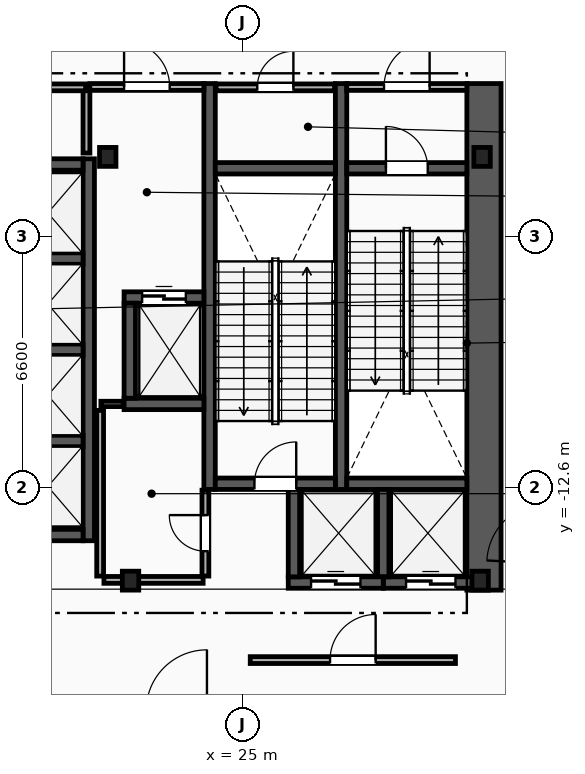
"""IFC4 building model, lengths in metres.
Left out: names, types, materials, properties, quantities, classifications, styles, units other than length and angle.
Written with IfcOpenShell. Run it as: python <this file> out.ifc"""

import sys

from ifc_helpers import new_model, si_unit, direction, frame, frame_2d, origin, origin_2d, place, context, subcontext, project, spatial, rectangle, i_section, extrude, element, fill, save


model = new_model("IFC4")
c1 = context("Model", 3, precision=1e-05, world=origin(), true_north=direction((0.0, 1.0)))
c2 = subcontext(c1, "Body", "Model", "MODEL_VIEW")
j1 = project(units=[si_unit("LENGTHUNIT", "METRE"), si_unit("PLANEANGLEUNIT", "RADIAN")], contexts=[c1])
p1 = place(None, origin())
s1 = spatial("IfcSite", under=j1, at=p1, CompositionType="ELEMENT")
p2 = place(p1, origin())
s2 = spatial("IfcBuilding", under=s1, at=p2, CompositionType="ELEMENT")
p3 = place(p2, origin())
s3 = spatial("IfcBuildingStorey", under=s2, at=p3, CompositionType="ELEMENT", Elevation=0.0)
for number, where, z_axis, x_axis in (
    (1, (31.3, -3.9, 0.0), (0.0, 0.0, 1.0), (1.0, 0.0, 0.0)),
    (2, (21.45, -3.9, 0.0), (0.0, 0.0, 1.0), (1.0, 0.0, 0.0)),
    (3, (22.05, -15.05, 0.0), (0.0, 0.0, 1.0), (1.0, 0.0, 0.0)),
    (4, (31.25, -15.05, 0.0), (0.0, 0.0, 1.0), (1.0, 0.0, 0.0)),
):
    element("IfcColumn", number, at=place(p3, frame(where, z_axis=z_axis, x_axis=x_axis)), inside=s3, PredefinedType="COLUMN", context=c2, shape_type="SweptSolid", body=[
        extrude(i_section(OverallWidth=0.432, OverallDepth=0.498, WebThickness=0.056, FlangeThickness=0.089, FilletRadius=0.018, at=origin_2d()), origin(), (0.0, 0.0, 1.0), 6.0),
    ])
p4 = place(p3, frame((31.35, -15.3, 0.0), z_axis=(0.0, 0.0, 1.0), x_axis=(0.0, 1.0, 0.0)))
e5 = element("IfcWall", 5, at=p4, inside=s3, PredefinedType="SHEAR", context=c2, shape_type="SweptSolid", body=[
    extrude(rectangle(XDim=13.33, YDim=0.9, at=frame_2d((6.665, 0.0))), origin(), (0.0, 0.0, 1.0), 5.65),
])
for number, where, z_axis, x_axis in (
    (6, (27.59, -12.65, 0.0), (0.0, 0.0, 1.0), (0.0, 1.0, 0.0)),
    (7, (24.13, -12.65, 0.0), (0.0, 0.0, 1.0), (0.0, 1.0, 0.0)),
):
    element("IfcWall", number, at=place(p3, frame(where, z_axis=z_axis, x_axis=x_axis)), inside=s3, PredefinedType="SHEAR", context=c2, shape_type="SweptSolid", body=[
        extrude(rectangle(XDim=10.68, YDim=0.3, at=frame_2d((5.34, 0.0))), origin(), (0.0, 0.0, 1.0), 5.65),
    ])
p5 = place(p3, frame((27.74, -4.2, 0.0), z_axis=(0.0, 0.0, 1.0), x_axis=(1.0, 0.0, 0.0)))
e8 = element("IfcWall", 8, at=p5, inside=s3, PredefinedType="SHEAR", context=c2, shape_type="SweptSolid", body=[
    extrude(rectangle(XDim=3.16, YDim=0.3, at=frame_2d((1.58, 0.0))), origin(), (0.0, 0.0, 1.0), 5.65),
])
p6 = place(p5, frame((1.03, 0.0, 0.0)))
e9 = element("IfcOpeningElement", 9, at=p6, cuts=e8, PredefinedType="OPENING", context=c2, shape_type="SweptSolid", body=[
    extrude(rectangle(XDim=1.1, YDim=2.15, at=frame_2d((0.55, 1.075))), frame((0.0, 0.16, 0.0), z_axis=(0.0, -1.0, 0.0), x_axis=(1.0, 0.0, 0.0)), (0.0, 0.0, 1.0), 0.32),
])
p7 = place(p3, frame((27.74, -12.5, 0.0), z_axis=(0.0, 0.0, 1.0), x_axis=(1.0, 0.0, 0.0)))
e10 = element("IfcWall", 10, at=p7, inside=s3, PredefinedType="SHEAR", context=c2, shape_type="SweptSolid", body=[
    extrude(rectangle(XDim=3.16, YDim=0.3, at=frame_2d((1.58, 0.0))), origin(), (0.0, 0.0, 1.0), 5.65),
])
p8 = place(p3, frame((24.28, -12.5, 0.0), z_axis=(0.0, 0.0, 1.0), x_axis=(1.0, 0.0, 0.0)))
e11 = element("IfcWall", 11, at=p8, inside=s3, PredefinedType="SHEAR", context=c2, shape_type="SweptSolid", body=[
    extrude(rectangle(XDim=3.16, YDim=0.3, at=frame_2d((1.58, 0.0))), origin(), (0.0, 0.0, 1.0), 5.65),
])
p9 = place(p8, frame((1.03, 0.0, 0.0)))
e12 = element("IfcOpeningElement", 12, at=p9, cuts=e11, PredefinedType="OPENING", context=c2, shape_type="SweptSolid", body=[
    extrude(rectangle(XDim=1.1, YDim=2.15, at=frame_2d((0.55, 1.075))), frame((0.0, 0.16, 0.0), z_axis=(0.0, -1.0, 0.0), x_axis=(1.0, 0.0, 0.0)), (0.0, 0.0, 1.0), 0.32),
])
p10 = place(p3, frame((24.28, -4.2, 0.0), z_axis=(0.0, 0.0, 1.0), x_axis=(1.0, 0.0, 0.0)))
e13 = element("IfcWall", 13, at=p10, inside=s3, PredefinedType="SHEAR", context=c2, shape_type="SweptSolid", body=[
    extrude(rectangle(XDim=3.16, YDim=0.3, at=frame_2d((1.58, 0.0))), origin(), (0.0, 0.0, 1.0), 5.65),
])
p11 = place(p3, frame((20.89, -3.8, 0.0), z_axis=(0.0, 0.0, 1.0), x_axis=(0.0, 1.0, 0.0)))
e14 = element("IfcWall", 14, at=p11, inside=s3, PredefinedType="PARTITIONING", context=c2, shape_type="SweptSolid", body=[
    extrude(rectangle(XDim=1.65, YDim=0.18, at=frame_2d((0.825, 0.0))), origin(), (0.0, 0.0, 1.0), 5.65),
])
p12 = place(p3, frame((20.98, -2.06, 0.0), z_axis=(0.0, 0.0, 1.0), x_axis=(1.0, 0.0, 0.0)))
e15 = element("IfcWall", 15, at=p12, inside=s3, PredefinedType="PARTITIONING", context=c2, shape_type="SweptSolid", body=[
    extrude(rectangle(XDim=3.0, YDim=0.18, at=frame_2d((1.5, 0.0))), origin(), (0.0, 0.0, 1.0), 5.65),
])
p13 = place(p12, frame((0.9, 0.0, 0.0)))
e16 = element("IfcOpeningElement", 16, at=p13, cuts=e15, PredefinedType="OPENING", context=c2, shape_type="SweptSolid", body=[
    extrude(rectangle(XDim=1.2, YDim=2.15, at=frame_2d((0.6, 1.075))), frame((0.0, 0.1, 0.0), z_axis=(0.0, -1.0, 0.0), x_axis=(1.0, 0.0, 0.0)), (0.0, 0.0, 1.0), 0.2),
])
p14 = place(p3, frame((27.74, -2.06, 0.0), z_axis=(0.0, 0.0, 1.0), x_axis=(1.0, 0.0, 0.0)))
e17 = element("IfcWall", 17, at=p14, inside=s3, PredefinedType="PARTITIONING", context=c2, shape_type="SweptSolid", body=[
    extrude(rectangle(XDim=3.16, YDim=0.18, at=frame_2d((1.58, 0.0))), origin(), (0.0, 0.0, 1.0), 5.65),
])
p15 = place(p14, frame((0.98, 0.0, 0.0)))
e18 = element("IfcOpeningElement", 18, at=p15, cuts=e17, PredefinedType="OPENING", context=c2, shape_type="SweptSolid", body=[
    extrude(rectangle(XDim=1.2, YDim=2.15, at=frame_2d((0.6, 1.075))), frame((0.0, 0.1, 0.0), z_axis=(0.0, -1.0, 0.0), x_axis=(1.0, 0.0, 0.0)), (0.0, 0.0, 1.0), 0.2),
])
p16 = place(p3, frame((25.2, -17.14, 0.0), z_axis=(0.0, 0.0, 1.0), x_axis=(1.0, 0.0, 0.0)))
e19 = element("IfcWall", 19, at=p16, inside=s3, PredefinedType="PARTITIONING", context=c2, shape_type="SweptSolid", body=[
    extrude(rectangle(XDim=5.4, YDim=0.18, at=frame_2d((2.7, 0.0))), origin(), (0.0, 0.0, 1.0), 5.65),
])
p17 = place(p16, frame((2.1, 0.0, 0.0)))
e20 = element("IfcOpeningElement", 20, at=p17, cuts=e19, PredefinedType="OPENING", context=c2, shape_type="SweptSolid", body=[
    extrude(rectangle(XDim=1.2, YDim=2.15, at=frame_2d((0.6, 1.075))), frame((0.0, 0.1, 0.0), z_axis=(0.0, -1.0, 0.0), x_axis=(1.0, 0.0, 0.0)), (0.0, 0.0, 1.0), 0.2),
])
p18 = place(p3, frame((21.88, -7.6, 0.0), z_axis=(0.0, 0.0, 1.0), x_axis=(1.0, 0.0, 0.0)))
e21 = element("IfcWall", 21, at=p18, inside=s3, PredefinedType="SHEAR", context=c2, shape_type="SweptSolid", body=[
    extrude(rectangle(XDim=2.1, YDim=0.3, at=frame_2d((1.05, 0.0))), origin(), (0.0, 0.0, 1.0), 5.65),
])
p19 = place(p18, frame((0.475, 0.0, 0.0)))
e22 = element("IfcOpeningElement", 22, at=p19, cuts=e21, PredefinedType="OPENING", context=c2, shape_type="SweptSolid", body=[
    extrude(rectangle(XDim=1.15, YDim=2.2, at=frame_2d((0.575, 1.1))), frame((0.0, 0.16, 0.0), z_axis=(0.0, -1.0, 0.0), x_axis=(1.0, 0.0, 0.0)), (0.0, 0.0, 1.0), 0.32),
])
p20 = place(p3, frame((21.88, -10.4, 0.0), z_axis=(0.0, 0.0, 1.0), x_axis=(1.0, 0.0, 0.0)))
e23 = element("IfcWall", 23, at=p20, inside=s3, PredefinedType="SHEAR", context=c2, shape_type="SweptSolid", body=[
    extrude(rectangle(XDim=2.1, YDim=0.3, at=frame_2d((1.05, 0.0))), origin(), (0.0, 0.0, 1.0), 5.65),
])
p21 = place(p3, frame((22.03, -10.25, 0.0), z_axis=(0.0, 0.0, 1.0), x_axis=(0.0, 1.0, 0.0)))
e24 = element("IfcWall", 24, at=p21, inside=s3, PredefinedType="SHEAR", context=c2, shape_type="SweptSolid", body=[
    extrude(rectangle(XDim=2.5, YDim=0.3, at=frame_2d((1.25, 0.0))), origin(), (0.0, 0.0, 1.0), 5.65),
])
p22 = place(p3, frame((28.7, -15.1, 0.0), z_axis=(0.0, 0.0, 1.0), x_axis=(1.0, 0.0, 0.0)))
e25 = element("IfcWall", 25, at=p22, inside=s3, PredefinedType="SHEAR", context=c2, shape_type="SweptSolid", body=[
    extrude(rectangle(XDim=2.5, YDim=0.3, at=frame_2d((1.25, 0.0))), origin(), (0.0, 0.0, 1.0), 5.65),
])
p23 = place(p22, frame((0.6, 0.0, 0.0)))
e26 = element("IfcOpeningElement", 26, at=p23, cuts=e25, PredefinedType="OPENING", context=c2, shape_type="SweptSolid", body=[
    extrude(rectangle(XDim=1.3, YDim=2.2, at=frame_2d((0.65, 1.1))), frame((0.0, 0.16, 0.0), z_axis=(0.0, -1.0, 0.0), x_axis=(1.0, 0.0, 0.0)), (0.0, 0.0, 1.0), 0.32),
])
p24 = place(p3, frame((28.7, -14.95, 0.0), z_axis=(0.0, 0.0, 1.0), x_axis=(0.0, 1.0, 0.0)))
e27 = element("IfcWall", 27, at=p24, inside=s3, PredefinedType="SHEAR", context=c2, shape_type="SweptSolid", body=[
    extrude(rectangle(XDim=2.3, YDim=0.3, at=frame_2d((1.15, 0.0))), origin(), (0.0, 0.0, 1.0), 5.65),
])
p25 = place(p3, frame((26.2, -15.1, 0.0), z_axis=(0.0, 0.0, 1.0), x_axis=(1.0, 0.0, 0.0)))
e28 = element("IfcWall", 28, at=p25, inside=s3, PredefinedType="SHEAR", context=c2, shape_type="SweptSolid", body=[
    extrude(rectangle(XDim=2.5, YDim=0.3, at=frame_2d((1.25, 0.0))), origin(), (0.0, 0.0, 1.0), 5.65),
])
p26 = place(p25, frame((0.6, 0.0, 0.0)))
e29 = element("IfcOpeningElement", 29, at=p26, cuts=e28, PredefinedType="OPENING", context=c2, shape_type="SweptSolid", body=[
    extrude(rectangle(XDim=1.3, YDim=2.2, at=frame_2d((0.65, 1.1))), frame((0.0, 0.16, 0.0), z_axis=(0.0, -1.0, 0.0), x_axis=(1.0, 0.0, 0.0)), (0.0, 0.0, 1.0), 0.32),
])
p27 = place(p3, frame((26.35, -14.95, 0.0), z_axis=(0.0, 0.0, 1.0), x_axis=(0.0, 1.0, 0.0)))
e30 = element("IfcWall", 30, at=p27, inside=s3, PredefinedType="SHEAR", context=c2, shape_type="SweptSolid", body=[
    extrude(rectangle(XDim=2.3, YDim=0.3, at=frame_2d((1.15, 0.0))), origin(), (0.0, 0.0, 1.0), 5.65),
])
p28 = place(p3, frame((20.95, -14.0, 0.0), z_axis=(0.0, 0.0, 1.0), x_axis=(0.0, 1.0, 0.0)))
e31 = element("IfcWall", 31, at=p28, inside=s3, PredefinedType="SHEAR", context=c2, shape_type="SweptSolid", body=[
    extrude(rectangle(XDim=10.05, YDim=0.3, at=frame_2d((5.025, 0.0))), origin(), (0.0, 0.0, 1.0), 5.65),
])
p29 = place(p3, frame((18.95, -13.85, 0.0), z_axis=(0.0, 0.0, 1.0), x_axis=(1.0, 0.0, 0.0)))
e32 = element("IfcWall", 32, at=p29, inside=s3, PredefinedType="SHEAR", context=c2, shape_type="SweptSolid", body=[
    extrude(rectangle(XDim=1.85, YDim=0.3, at=frame_2d((0.925, 0.0))), origin(), (0.0, 0.0, 1.0), 5.65),
])
p30 = place(p3, frame((18.65, -4.1, 0.0), z_axis=(0.0, 0.0, 1.0), x_axis=(1.0, 0.0, 0.0)))
e33 = element("IfcWall", 33, at=p30, inside=s3, PredefinedType="SHEAR", context=c2, shape_type="SweptSolid", body=[
    extrude(rectangle(XDim=2.15, YDim=0.3, at=frame_2d((1.075, 0.0))), origin(), (0.0, 0.0, 1.0), 5.65),
])
for number, where, z_axis, x_axis in (
    (34, (18.95, -11.375, 0.0), (0.0, 0.0, 1.0), (1.0, 0.0, 0.0)),
    (35, (18.95, -8.975, 0.0), (0.0, 0.0, 1.0), (1.0, 0.0, 0.0)),
    (36, (18.95, -6.575, 0.0), (0.0, 0.0, 1.0), (1.0, 0.0, 0.0)),
):
    element("IfcWall", number, at=place(p3, frame(where, z_axis=z_axis, x_axis=x_axis)), inside=s3, PredefinedType="SHEAR", context=c2, shape_type="SweptSolid", body=[
        extrude(rectangle(XDim=1.85, YDim=0.3, at=frame_2d((0.925, 0.0))), origin(), (0.0, 0.0, 1.0), 5.65),
    ])
p31 = place(p3, frame((17.12, -2.07, 0.0), z_axis=(0.0, 0.0, 1.0), x_axis=(1.0, 0.0, 0.0)))
e37 = element("IfcWall", 37, at=p31, inside=s3, PredefinedType="PARTITIONING", context=c2, shape_type="SweptSolid", body=[
    extrude(rectangle(XDim=3.75, YDim=0.18, at=frame_2d((1.875, 0.0))), origin(), (0.0, 0.0, 1.0), 5.65),
])
p32 = place(p31, frame((1.4, 0.0, 0.0)))
e38 = element("IfcOpeningElement", 38, at=p32, cuts=e37, PredefinedType="OPENING", context=c2, shape_type="SweptSolid", body=[
    extrude(rectangle(XDim=0.95, YDim=2.1, at=frame_2d((0.475, 1.05))), frame((0.0, 0.1, 0.0), z_axis=(0.0, -1.0, 0.0), x_axis=(1.0, 0.0, 0.0)), (0.0, 0.0, 1.0), 0.2),
])
p33 = place(p3, frame((21.27, -10.4, 0.0), z_axis=(0.0, 0.0, 1.0), x_axis=(1.0, 0.0, 0.0)))
e39 = element("IfcWall", 39, at=p33, inside=s3, PredefinedType="PARTITIONING", context=c2, shape_type="SweptSolid", body=[
    extrude(rectangle(XDim=0.59, YDim=0.14, at=frame_2d((0.295, 0.0))), origin(), (0.0, 0.0, 1.0), 5.65),
])
p34 = place(p3, frame((21.25, -14.93, 0.0), z_axis=(0.0, 0.0, 1.0), x_axis=(0.0, 1.0, 0.0)))
e40 = element("IfcWall", 40, at=p34, inside=s3, PredefinedType="PARTITIONING", context=c2, shape_type="SweptSolid", body=[
    extrude(rectangle(XDim=4.36, YDim=0.18, at=frame_2d((2.18, 0.0))), origin(), (0.0, 0.0, 1.0), 5.65),
])
p35 = place(p3, frame((21.35, -15.03, 0.0), z_axis=(0.0, 0.0, 1.0), x_axis=(1.0, 0.0, 0.0)))
e41 = element("IfcWall", 41, at=p35, inside=s3, PredefinedType="PARTITIONING", context=c2, shape_type="SweptSolid", body=[
    extrude(rectangle(XDim=2.61, YDim=0.18, at=frame_2d((1.305, 0.0))), origin(), (0.0, 0.0, 1.0), 4.723),
])
p36 = place(p3, frame((24.3, -2.07, 0.0), z_axis=(0.0, 0.0, 1.0), x_axis=(1.0, 0.0, 0.0)))
e42 = element("IfcWall", 42, at=p36, inside=s3, PredefinedType="PARTITIONING", context=c2, shape_type="SweptSolid", body=[
    extrude(rectangle(XDim=3.12, YDim=0.18, at=frame_2d((1.56, 0.0))), origin(), (0.0, 0.0, 1.0), 5.65),
])
p37 = place(p36, frame((1.085, 0.0, 0.0)))
e43 = element("IfcOpeningElement", 43, at=p37, cuts=e42, PredefinedType="OPENING", context=c2, shape_type="SweptSolid", body=[
    extrude(rectangle(XDim=0.95, YDim=2.1, at=frame_2d((0.475, 1.05))), frame((0.0, 0.1, 0.0), z_axis=(0.0, -1.0, 0.0), x_axis=(1.0, 0.0, 0.0)), (0.0, 0.0, 1.0), 0.2),
])
p38 = place(p3, frame((24.02, -14.93, 0.0), z_axis=(0.0, 0.0, 1.0), x_axis=(0.0, 1.0, 0.0)))
e44 = element("IfcWall", 44, at=p38, inside=s3, PredefinedType="PARTITIONING", context=c2, shape_type="SweptSolid", body=[
    extrude(rectangle(XDim=2.26, YDim=0.18, at=frame_2d((1.13, 0.0))), origin(), (0.0, 0.0, 1.0), 5.65),
])
p39 = place(p38, frame((0.655, 0.0, 0.0)))
e45 = element("IfcOpeningElement", 45, at=p39, cuts=e44, PredefinedType="OPENING", context=c2, shape_type="SweptSolid", body=[
    extrude(rectangle(XDim=0.95, YDim=2.1, at=frame_2d((0.475, 1.05))), frame((0.0, 0.1, 0.0), z_axis=(0.0, -1.0, 0.0), x_axis=(1.0, 0.0, 0.0)), (0.0, 0.0, 1.0), 0.2),
])
p40 = place(p6, origin())
e46 = element("IfcDoor", 46, at=p40, inside=s3, OperationType="SINGLE_SWING_LEFT", PredefinedType="DOOR", context=c2, shape_type="SweptSolid", body=[
    extrude(rectangle(XDim=1.1, YDim=2.15, at=frame_2d((0.55, 1.075))), frame((0.0, 0.025, 0.0), z_axis=(0.0, -1.0, 0.0), x_axis=(1.0, 0.0, 0.0)), (0.0, 0.0, 1.0), 0.05),
])
fill(e9, e46)
p41 = place(p9, origin())
e47 = element("IfcDoor", 47, at=p41, inside=s3, OperationType="SINGLE_SWING_RIGHT", PredefinedType="DOOR", context=c2, shape_type="SweptSolid", body=[
    extrude(rectangle(XDim=1.1, YDim=2.15, at=frame_2d((0.55, 1.075))), frame((0.0, 0.025, 0.0), z_axis=(0.0, -1.0, 0.0), x_axis=(1.0, 0.0, 0.0)), (0.0, 0.0, 1.0), 0.05),
])
fill(e12, e47)
p42 = place(p13, origin())
e48 = element("IfcDoor", 48, at=p42, inside=s3, OperationType="SINGLE_SWING_LEFT", PredefinedType="DOOR", context=c2, shape_type="SweptSolid", body=[
    extrude(rectangle(XDim=1.2, YDim=2.15, at=frame_2d((0.6, 1.075))), frame((0.0, 0.025, 0.0), z_axis=(0.0, -1.0, 0.0), x_axis=(1.0, 0.0, 0.0)), (0.0, 0.0, 1.0), 0.05),
])
fill(e16, e48)
p43 = place(p15, origin())
e49 = element("IfcDoor", 49, at=p43, inside=s3, OperationType="SINGLE_SWING_RIGHT", PredefinedType="DOOR", context=c2, shape_type="SweptSolid", body=[
    extrude(rectangle(XDim=1.2, YDim=2.15, at=frame_2d((0.6, 1.075))), frame((0.0, 0.025, 0.0), z_axis=(0.0, -1.0, 0.0), x_axis=(1.0, 0.0, 0.0)), (0.0, 0.0, 1.0), 0.05),
])
fill(e18, e49)
p44 = place(p17, origin())
e50 = element("IfcDoor", 50, at=p44, inside=s3, OperationType="SINGLE_SWING_RIGHT", PredefinedType="DOOR", context=c2, shape_type="SweptSolid", body=[
    extrude(rectangle(XDim=1.2, YDim=2.15, at=frame_2d((0.6, 1.075))), frame((0.0, 0.025, 0.0), z_axis=(0.0, -1.0, 0.0), x_axis=(1.0, 0.0, 0.0)), (0.0, 0.0, 1.0), 0.05),
])
fill(e20, e50)
p45 = place(p19, origin())
e51 = element("IfcDoor", 51, at=p45, inside=s3, OperationType="SLIDING_TO_LEFT", PredefinedType="TRAPDOOR", context=c2, shape_type="SweptSolid", body=[
    extrude(rectangle(XDim=1.15, YDim=2.2, at=frame_2d((0.575, 1.1))), frame((0.0, 0.025, 0.0), z_axis=(0.0, -1.0, 0.0), x_axis=(1.0, 0.0, 0.0)), (0.0, 0.0, 1.0), 0.05),
])
fill(e22, e51)
p46 = place(p23, origin())
e52 = element("IfcDoor", 52, at=p46, inside=s3, OperationType="SLIDING_TO_LEFT", PredefinedType="TRAPDOOR", context=c2, shape_type="SweptSolid", body=[
    extrude(rectangle(XDim=1.3, YDim=2.2, at=frame_2d((0.65, 1.1))), frame((0.0, 0.025, 0.0), z_axis=(0.0, -1.0, 0.0), x_axis=(1.0, 0.0, 0.0)), (0.0, 0.0, 1.0), 0.05),
])
fill(e26, e52)
p47 = place(p26, origin())
e53 = element("IfcDoor", 53, at=p47, inside=s3, OperationType="SLIDING_TO_LEFT", PredefinedType="TRAPDOOR", context=c2, shape_type="SweptSolid", body=[
    extrude(rectangle(XDim=1.3, YDim=2.2, at=frame_2d((0.65, 1.1))), frame((0.0, 0.025, 0.0), z_axis=(0.0, -1.0, 0.0), x_axis=(1.0, 0.0, 0.0)), (0.0, 0.0, 1.0), 0.05),
])
fill(e29, e53)
p48 = place(p37, origin())
e54 = element("IfcDoor", 54, at=p48, inside=s3, OperationType="SINGLE_SWING_RIGHT", PredefinedType="DOOR", context=c2, shape_type="SweptSolid", body=[
    extrude(rectangle(XDim=0.95, YDim=2.1, at=frame_2d((0.475, 1.05))), frame((0.0, 0.025, 0.0), z_axis=(0.0, -1.0, 0.0), x_axis=(1.0, 0.0, 0.0)), (0.0, 0.0, 1.0), 0.05),
])
fill(e43, e54)
p49 = place(p39, origin())
e55 = element("IfcDoor", 55, at=p49, inside=s3, OperationType="SINGLE_SWING_RIGHT", PredefinedType="DOOR", context=c2, shape_type="SweptSolid", body=[
    extrude(rectangle(XDim=0.95, YDim=2.1, at=frame_2d((0.475, 1.05))), frame((0.0, 0.025, 0.0), z_axis=(0.0, -1.0, 0.0), x_axis=(1.0, 0.0, 0.0)), (0.0, 0.0, 1.0), 0.05),
])
fill(e45, e55)
save(model, sys.argv[1])
